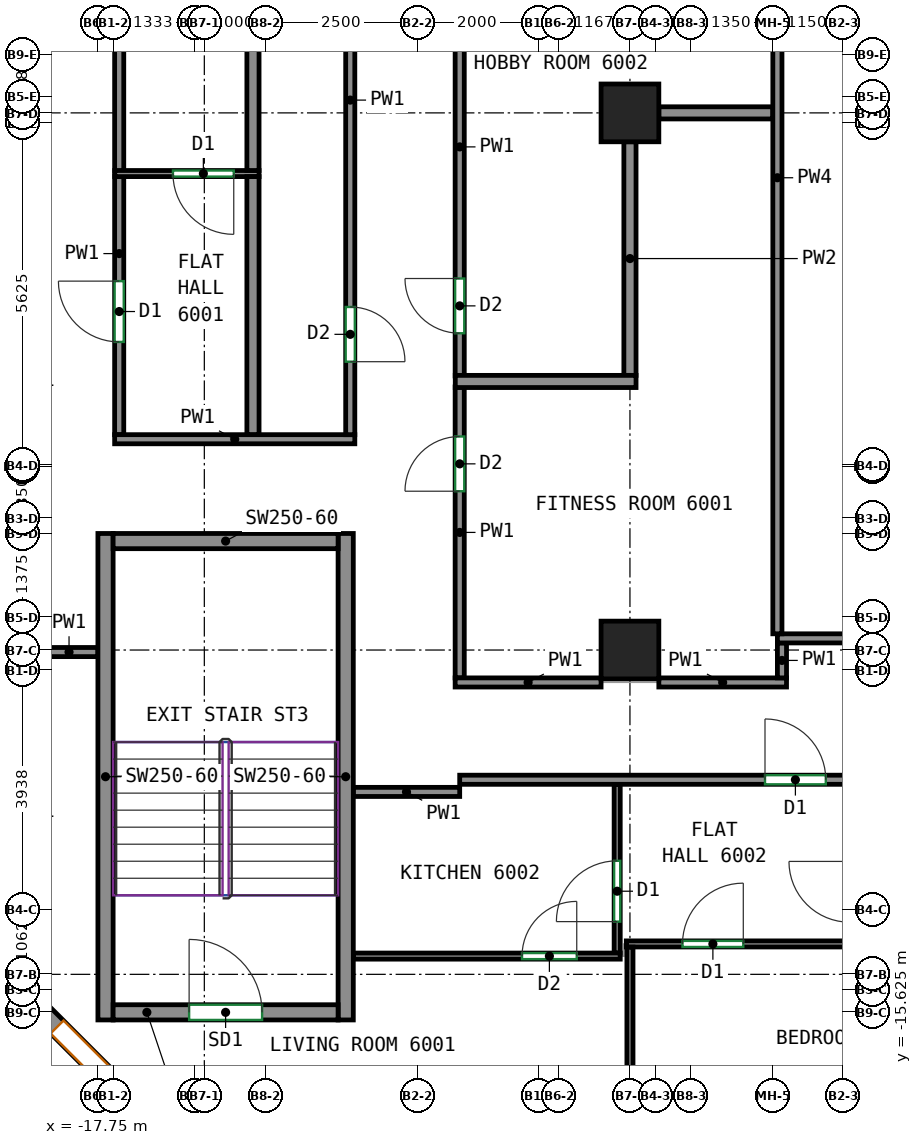
"""IFC4 building model, lengths in metres.
Left out: names, types, materials, properties, quantities, classifications, styles, units other than length and angle.
Written with IfcOpenShell. Run it as: python <this file> out.ifc"""

import sys

from ifc_helpers import new_model, si_unit, direction, frame, frame_2d, origin, origin_2d, place, context, subcontext, project, spatial, rectangle, extrude, source, transform, mapped, element, fill, save


model = new_model("IFC4")
c1 = context("Model", 3, precision=1e-05, world=origin(), true_north=direction((0.0, 1.0)))
c2 = subcontext(c1, "Body", "Model", "MODEL_VIEW")
j1 = project(units=[si_unit("LENGTHUNIT", "METRE"), si_unit("PLANEANGLEUNIT", "RADIAN")], contexts=[c1])
p1 = place(None, origin())
s1 = spatial("IfcSite", under=j1, at=p1, CompositionType="ELEMENT")
p2 = place(p1, origin())
s2 = spatial("IfcBuilding", under=s1, at=p2, CompositionType="ELEMENT")
p3 = place(p2, frame((0.0, 0.0, 249.2)))
s3 = spatial("IfcBuildingStorey", under=s2, at=p3, CompositionType="ELEMENT", Elevation=249.2)
m1 = source(origin(), c2, "Body", "SweptSolid", [
    extrude(rectangle(XDim=0.95, YDim=0.95, at=origin_2d()), origin(), (0.0, 0.0, 1.0), 3.12),
])
for number, where, z_axis, x_axis in (
    (1, (-9.0, -9.667, 0.0), (0.0, 0.0, 1.0), (1.0, 0.0, 0.0)),
    (2, (-9.0, -0.833, 0.0), (0.0, 0.0, 1.0), (1.0, 0.0, 0.0)),
):
    element("IfcColumn", number, at=place(p3, frame(where, z_axis=z_axis, x_axis=x_axis)), inside=s3, PredefinedType="COLUMN", context=c2, shape_type="MappedRepresentation", body=[
        mapped(m1, transform((0.0, 0.0, 0.0))),
    ])
m2 = source(origin(), c2, "Body", "SweptSolid", [
    extrude(rectangle(XDim=8.0, YDim=0.25, at=frame_2d((4.0, 0.0))), origin(), (0.0, 0.0, 1.0), 3.12),
])
for number, where, z_axis, x_axis in (
    (3, (-17.625, -15.75, 0.0), (0.0, 0.0, 1.0), (0.0, 1.0, 0.0)),
    (4, (-13.675, -15.75, 0.0), (0.0, 0.0, 1.0), (0.0, 1.0, 0.0)),
):
    element("IfcWall", number, at=place(p3, frame(where, z_axis=z_axis, x_axis=x_axis)), inside=s3, PredefinedType="SHEAR", context=c2, shape_type="MappedRepresentation", body=[
        mapped(m2, transform((0.0, 0.0, 0.0))),
    ])
m3 = source(origin(), c2, "Body", "SweptSolid", [
    extrude(rectangle(XDim=3.7, YDim=0.25, at=frame_2d((1.85, 0.0))), origin(), (0.0, 0.0, 1.0), 3.12),
])
p4 = place(p3, frame((-17.5, -15.625, 0.0), z_axis=(0.0, 0.0, 1.0), x_axis=(1.0, 0.0, 0.0)))
e5 = element("IfcWall", 5, at=p4, inside=s3, PredefinedType="SHEAR", context=c2, shape_type="MappedRepresentation", body=[
    mapped(m3, transform((0.0, 0.0, 0.0))),
])
p5 = place(p4, frame((1.25, 0.0, 0.0)))
e6 = element("IfcOpeningElement", 6, at=p5, cuts=e5, PredefinedType="OPENING", context=c2, shape_type="SweptSolid", body=[
    extrude(rectangle(XDim=1.2, YDim=2.1, at=frame_2d((0.6, 1.05))), frame((0.0, 0.135, 0.0), z_axis=(0.0, -1.0, 0.0), x_axis=(1.0, 0.0, 0.0)), (0.0, 0.0, 1.0), 0.27),
])
p6 = place(p3, frame((-17.5, -7.875, 0.0), z_axis=(0.0, 0.0, 1.0), x_axis=(1.0, 0.0, 0.0)))
e7 = element("IfcWall", 7, at=p6, inside=s3, PredefinedType="SHEAR", context=c2, shape_type="MappedRepresentation", body=[
    mapped(m3, transform((0.0, 0.0, 0.0))),
])
m4 = source(origin(), c2, "Body", "SweptSolid", [
    extrude(rectangle(XDim=3.323, YDim=0.3, at=frame_2d((1.662, 0.0))), origin(), (0.0, 0.0, 1.0), 3.12),
])
p7 = place(p3, frame((-18.819, -15.469, 0.0), z_axis=(0.0, 0.0, 1.0), x_axis=(0.707070049321, -0.707143511144, 0.0)))
e8 = element("IfcWall", 8, at=p7, inside=s3, PredefinedType="SOLIDWALL", context=c2, shape_type="MappedRepresentation", body=[
    mapped(m4, transform((0.0, 0.0, 0.0))),
])
p8 = place(p7, frame((0.562, 0.0, 0.8)))
e9 = element("IfcOpeningElement", 9, at=p8, cuts=e8, PredefinedType="OPENING", context=c2, shape_type="SweptSolid", body=[
    extrude(rectangle(XDim=2.2, YDim=2.05, at=frame_2d((1.1, 1.025))), frame((0.0, 0.16, 0.0), z_axis=(0.0, -1.0, 0.0), x_axis=(1.0, 0.0, 0.0)), (0.0, 0.0, 1.0), 0.32),
])
p9 = place(p3, frame((-17.4, -6.125, 0.0), z_axis=(0.0, 0.0, 1.0), x_axis=(0.0, 1.0, 0.0)))
e10 = element("IfcWall", 10, at=p9, inside=s3, PredefinedType="PARTITIONING", context=c2, shape_type="SweptSolid", body=[
    extrude(rectangle(XDim=4.254, YDim=0.15, at=frame_2d((2.127, 0.0))), origin(), (0.0, 0.0, 1.0), 3.12),
])
p10 = place(p9, frame((1.525, 0.0, 0.0)))
e11 = element("IfcOpeningElement", 11, at=p10, cuts=e10, PredefinedType="OPENING", context=c2, shape_type="SweptSolid", body=[
    extrude(rectangle(XDim=1.0, YDim=2.1, at=frame_2d((0.5, 1.05))), frame((0.0, 0.085, 0.0), z_axis=(0.0, -1.0, 0.0), x_axis=(1.0, 0.0, 0.0)), (0.0, 0.0, 1.0), 0.17),
])
p11 = place(p3, frame((-17.475, -6.2, 0.0), z_axis=(0.0, 0.0, 1.0), x_axis=(1.0, 0.0, 0.0)))
e12 = element("IfcWall", 12, at=p11, inside=s3, PredefinedType="PARTITIONING", context=c2, shape_type="SweptSolid", body=[
    extrude(rectangle(XDim=3.95, YDim=0.15, at=frame_2d((1.975, 0.0))), origin(), (0.0, 0.0, 1.0), 3.12),
])
p12 = place(p3, frame((-17.4, -1.791, 0.0), z_axis=(0.0, 0.0, 1.0), x_axis=(0.0, 1.0, 0.0)))
e13 = element("IfcWall", 13, at=p12, inside=s3, PredefinedType="PARTITIONING", context=c2, shape_type="SweptSolid", body=[
    extrude(rectangle(XDim=5.925, YDim=0.15, at=frame_2d((2.962, 0.0))), origin(), (0.0, 0.0, 1.0), 3.12),
])
p13 = place(p3, frame((-11.8, -11.8, 0.0), z_axis=(0.0, 0.0, 1.0), x_axis=(1.0, 0.0, 0.0)))
e14 = element("IfcWall", 14, at=p13, inside=s3, PredefinedType="PARTITIONING", context=c2, shape_type="SweptSolid", body=[
    extrude(rectangle(XDim=27.31, YDim=0.15, at=frame_2d((13.655, 0.0))), origin(), (0.0, 0.0, 1.0), 3.12),
])
p14 = place(p13, frame((5.021, 0.0, 0.0)))
e15 = element("IfcOpeningElement", 15, at=p14, cuts=e14, PredefinedType="OPENING", context=c2, shape_type="SweptSolid", body=[
    extrude(rectangle(XDim=1.0, YDim=2.1, at=frame_2d((0.5, 1.05))), frame((0.0, 0.085, 0.0), z_axis=(0.0, -1.0, 0.0), x_axis=(1.0, 0.0, 0.0)), (0.0, 0.0, 1.0), 0.17),
])
p15 = place(p13, frame((18.457, 0.0, 0.0)))
e16 = element("IfcOpeningElement", 16, at=p15, cuts=e14, PredefinedType="OPENING", context=c2, shape_type="SweptSolid", body=[
    extrude(rectangle(XDim=1.0, YDim=2.1, at=frame_2d((0.5, 1.05))), frame((0.0, 0.085, 0.0), z_axis=(0.0, -1.0, 0.0), x_axis=(1.0, 0.0, 0.0)), (0.0, 0.0, 1.0), 0.17),
])
p16 = place(p3, frame((-13.55, -12.0, 0.0), z_axis=(0.0, 0.0, 1.0), x_axis=(1.0, 0.0, 0.0)))
e17 = element("IfcWall", 17, at=p16, inside=s3, PredefinedType="PARTITIONING", context=c2, shape_type="SweptSolid", body=[
    extrude(rectangle(XDim=1.75, YDim=0.15, at=frame_2d((0.875, 0.0))), origin(), (0.0, 0.0, 1.0), 3.12),
])
p17 = place(p3, frame((-18.7, -9.7, 0.0), z_axis=(0.0, 0.0, 1.0), x_axis=(1.0, 0.0, 0.0)))
e18 = element("IfcWall", 18, at=p17, inside=s3, PredefinedType="PARTITIONING", context=c2, shape_type="SweptSolid", body=[
    extrude(rectangle(XDim=0.95, YDim=0.15, at=frame_2d((0.475, 0.0))), origin(), (0.0, 0.0, 1.0), 3.12),
])
p18 = place(p3, frame((-13.6, 4.879, 0.0), z_axis=(0.0, 0.0, 1.0), x_axis=(0.0, -1.0, 0.0)))
e19 = element("IfcWall", 19, at=p18, inside=s3, PredefinedType="PARTITIONING", context=c2, shape_type="SweptSolid", body=[
    extrude(rectangle(XDim=11.004, YDim=0.15, at=frame_2d((5.502, 0.0))), origin(), (0.0, 0.0, 1.0), 3.12),
])
p19 = place(p18, frame((8.904, 0.0, 0.0)))
e20 = element("IfcOpeningElement", 20, at=p19, cuts=e19, PredefinedType="OPENING", context=c2, shape_type="SweptSolid", body=[
    extrude(rectangle(XDim=0.9, YDim=2.1, at=frame_2d((0.45, 1.05))), frame((0.0, 0.085, 0.0), z_axis=(0.0, -1.0, 0.0), x_axis=(1.0, 0.0, 0.0)), (0.0, 0.0, 1.0), 0.17),
])
p20 = place(p3, frame((-11.8, -5.16, 0.0), z_axis=(0.0, 0.0, 1.0), x_axis=(0.0, 1.0, 0.0)))
e21 = element("IfcWall", 21, at=p20, inside=s3, PredefinedType="PARTITIONING", context=c2, shape_type="SweptSolid", body=[
    extrude(rectangle(XDim=7.535, YDim=0.15, at=frame_2d((3.768, 0.0))), origin(), (0.0, 0.0, 1.0), 3.12),
])
p21 = place(p20, frame((0.703, 0.0, 0.0)))
e22 = element("IfcOpeningElement", 22, at=p21, cuts=e21, PredefinedType="OPENING", context=c2, shape_type="SweptSolid", body=[
    extrude(rectangle(XDim=0.9, YDim=2.1, at=frame_2d((0.45, 1.05))), frame((0.0, 0.085, 0.0), z_axis=(0.0, -1.0, 0.0), x_axis=(1.0, 0.0, 0.0)), (0.0, 0.0, 1.0), 0.17),
])
p22 = place(p3, frame((-11.8, -10.125, 0.0), z_axis=(0.0, 0.0, 1.0), x_axis=(0.0, 1.0, 0.0)))
e23 = element("IfcWall", 23, at=p22, inside=s3, PredefinedType="PARTITIONING", context=c2, shape_type="SweptSolid", body=[
    extrude(rectangle(XDim=4.785, YDim=0.15, at=frame_2d((2.393, 0.0))), origin(), (0.0, 0.0, 1.0), 3.12),
])
p23 = place(p22, frame((3.07, 0.0, 0.0)))
e24 = element("IfcOpeningElement", 24, at=p23, cuts=e23, PredefinedType="OPENING", context=c2, shape_type="SweptSolid", body=[
    extrude(rectangle(XDim=0.9, YDim=2.1, at=frame_2d((0.45, 1.05))), frame((0.0, 0.085, 0.0), z_axis=(0.0, -1.0, 0.0), x_axis=(1.0, 0.0, 0.0)), (0.0, 0.0, 1.0), 0.17),
])
p24 = place(p3, frame((-8.525, -10.2, 0.0), z_axis=(0.0, 0.0, 1.0), x_axis=(1.0, 0.0, 0.0)))
e25 = element("IfcWall", 25, at=p24, inside=s3, PredefinedType="PARTITIONING", context=c2, shape_type="SweptSolid", body=[
    extrude(rectangle(XDim=2.1, YDim=0.15, at=frame_2d((1.05, 0.0))), origin(), (0.0, 0.0, 1.0), 3.12),
])
p25 = place(p3, frame((-11.875, -10.2, 0.0), z_axis=(0.0, 0.0, 1.0), x_axis=(1.0, 0.0, 0.0)))
e26 = element("IfcWall", 26, at=p25, inside=s3, PredefinedType="PARTITIONING", context=c2, shape_type="SweptSolid", body=[
    extrude(rectangle(XDim=2.4, YDim=0.15, at=frame_2d((1.2, 0.0))), origin(), (0.0, 0.0, 1.0), 3.12),
])
p26 = place(p3, frame((-6.5, -9.55, 0.0), z_axis=(0.0, 0.0, 1.0), x_axis=(0.0, -1.0, 0.0)))
e27 = element("IfcWall", 27, at=p26, inside=s3, PredefinedType="PARTITIONING", context=c2, shape_type="SweptSolid", body=[
    extrude(rectangle(XDim=0.575, YDim=0.15, at=frame_2d((0.288, 0.0))), origin(), (0.0, 0.0, 1.0), 3.12),
])
p27 = place(p3, frame((-15.1, -1.831, 0.0), z_axis=(0.0, 0.0, 1.0), x_axis=(-1.0, 0.0, 0.0)))
e28 = element("IfcWall", 28, at=p27, inside=s3, PredefinedType="PARTITIONING", context=c2, shape_type="SweptSolid", body=[
    extrude(rectangle(XDim=2.373, YDim=0.1, at=frame_2d((1.187, 0.0))), origin(), (0.0, 0.0, 1.0), 3.12),
])
p28 = place(p27, frame((0.416, 0.0, 0.0)))
e29 = element("IfcOpeningElement", 29, at=p28, cuts=e28, PredefinedType="OPENING", context=c2, shape_type="SweptSolid", body=[
    extrude(rectangle(XDim=1.0, YDim=2.1, at=frame_2d((0.5, 1.05))), frame((0.0, 0.06, 0.0), z_axis=(0.0, -1.0, 0.0), x_axis=(1.0, 0.0, 0.0)), (0.0, 0.0, 1.0), 0.12),
])
p29 = place(p3, frame((-15.2, -6.123, 0.0), z_axis=(0.0, 0.0, 1.0), x_axis=(0.0, 1.0, 0.0)))
e30 = element("IfcWall", 30, at=p29, inside=s3, PredefinedType="PARTITIONING", context=c2, shape_type="SweptSolid", body=[
    extrude(rectangle(XDim=4.242, YDim=0.2, at=frame_2d((2.121, 0.0))), origin(), (0.0, 0.0, 1.0), 3.12),
])
p30 = place(p3, frame((-15.2, -1.781, 0.0), z_axis=(0.0, 0.0, 1.0), x_axis=(0.0, 1.0, 0.0)))
e31 = element("IfcWall", 31, at=p30, inside=s3, PredefinedType="PARTITIONING", context=c2, shape_type="SweptSolid", body=[
    extrude(rectangle(XDim=5.905, YDim=0.2, at=frame_2d((2.953, 0.0))), origin(), (0.0, 0.0, 1.0), 3.12),
])
p31 = place(p3, frame((-9.21, -14.65, 0.0), z_axis=(0.0, 0.0, 1.0), x_axis=(0.0, 1.0, 0.0)))
e32 = element("IfcWall", 32, at=p31, inside=s3, PredefinedType="PARTITIONING", context=c2, shape_type="SweptSolid", body=[
    extrude(rectangle(XDim=2.773, YDim=0.1, at=frame_2d((1.386, 0.0))), origin(), (0.0, 0.0, 1.0), 3.12),
])
p32 = place(p31, frame((0.517, 0.0, 0.0)))
e33 = element("IfcOpeningElement", 33, at=p32, cuts=e32, PredefinedType="OPENING", context=c2, shape_type="SweptSolid", body=[
    extrude(rectangle(XDim=1.0, YDim=2.1, at=frame_2d((0.5, 1.05))), frame((0.0, 0.06, 0.0), z_axis=(0.0, -1.0, 0.0), x_axis=(1.0, 0.0, 0.0)), (0.0, 0.0, 1.0), 0.12),
])
p33 = place(p3, frame((-13.55, -14.7, 0.0), z_axis=(0.0, 0.0, 1.0), x_axis=(1.0, 0.0, 0.0)))
e34 = element("IfcWall", 34, at=p33, inside=s3, PredefinedType="PARTITIONING", context=c2, shape_type="SweptSolid", body=[
    extrude(rectangle(XDim=4.39, YDim=0.1, at=frame_2d((2.195, 0.0))), origin(), (0.0, 0.0, 1.0), 3.12),
])
p34 = place(p33, frame((2.775, 0.0, 0.0)))
e35 = element("IfcOpeningElement", 35, at=p34, cuts=e34, PredefinedType="OPENING", context=c2, shape_type="SweptSolid", body=[
    extrude(rectangle(XDim=0.9, YDim=2.1, at=frame_2d((0.45, 1.05))), frame((0.0, 0.06, 0.0), z_axis=(0.0, -1.0, 0.0), x_axis=(1.0, 0.0, 0.0)), (0.0, 0.0, 1.0), 0.12),
])
p35 = place(p3, frame((-9.06, -14.5, 0.0), z_axis=(0.0, 0.0, 1.0), x_axis=(1.0, 0.0, 0.0)))
e36 = element("IfcWall", 36, at=p35, inside=s3, PredefinedType="PARTITIONING", context=c2, shape_type="SweptSolid", body=[
    extrude(rectangle(XDim=24.66, YDim=0.1, at=frame_2d((12.33, 0.0))), origin(), (0.0, 0.0, 1.0), 3.12),
])
p36 = place(p35, frame((0.924, 0.0, 0.0)))
e37 = element("IfcOpeningElement", 37, at=p36, cuts=e36, PredefinedType="OPENING", context=c2, shape_type="SweptSolid", body=[
    extrude(rectangle(XDim=1.0, YDim=2.1, at=frame_2d((0.5, 1.05))), frame((0.0, 0.06, 0.0), z_axis=(0.0, -1.0, 0.0), x_axis=(1.0, 0.0, 0.0)), (0.0, 0.0, 1.0), 0.12),
])
p37 = place(p35, frame((15.945, 0.0, 0.0)))
e38 = element("IfcOpeningElement", 38, at=p37, cuts=e36, PredefinedType="OPENING", context=c2, shape_type="SweptSolid", body=[
    extrude(rectangle(XDim=1.0, YDim=2.1, at=frame_2d((0.5, 1.05))), frame((0.0, 0.06, 0.0), z_axis=(0.0, -1.0, 0.0), x_axis=(1.0, 0.0, 0.0)), (0.0, 0.0, 1.0), 0.12),
])
p38 = place(p35, frame((18.387, 0.0, 0.0)))
e39 = element("IfcOpeningElement", 39, at=p38, cuts=e36, PredefinedType="OPENING", context=c2, shape_type="SweptSolid", body=[
    extrude(rectangle(XDim=1.0, YDim=2.1, at=frame_2d((0.5, 1.05))), frame((0.0, 0.06, 0.0), z_axis=(0.0, -1.0, 0.0), x_axis=(1.0, 0.0, 0.0)), (0.0, 0.0, 1.0), 0.12),
])
p39 = place(p3, frame((-9.0, -17.7, 0.0), z_axis=(0.0, 0.0, 1.0), x_axis=(0.0, 1.0, 0.0)))
e40 = element("IfcWall", 40, at=p39, inside=s3, PredefinedType="PARTITIONING", context=c2, shape_type="SweptSolid", body=[
    extrude(rectangle(XDim=3.148, YDim=0.1, at=frame_2d((1.574, 0.0))), origin(), (0.0, 0.0, 1.0), 3.12),
])
p40 = place(p3, frame((-8.525, -0.833, 0.0), z_axis=(0.0, 0.0, 1.0), x_axis=(1.0, 0.0, 0.0)))
e41 = element("IfcWall", 41, at=p40, inside=s3, PredefinedType="PARTITIONING", context=c2, shape_type="SweptSolid", body=[
    extrude(rectangle(XDim=1.875, YDim=0.2, at=frame_2d((0.938, 0.0))), origin(), (0.0, 0.0, 1.0), 3.12),
])
p41 = place(p3, frame((-9.0, -5.15, 0.0), z_axis=(0.0, 0.0, 1.0), x_axis=(0.0, 1.0, 0.0)))
e42 = element("IfcWall", 42, at=p41, inside=s3, PredefinedType="PARTITIONING", context=c2, shape_type="SweptSolid", body=[
    extrude(rectangle(XDim=3.842, YDim=0.2, at=frame_2d((1.921, 0.0))), origin(), (0.0, 0.0, 1.0), 2.57),
])
p42 = place(p3, frame((-11.873, -5.25, 0.0), z_axis=(0.0, 0.0, 1.0), x_axis=(1.0, 0.0, 0.0)))
e43 = element("IfcWall", 43, at=p42, inside=s3, PredefinedType="PARTITIONING", context=c2, shape_type="SweptSolid", body=[
    extrude(rectangle(XDim=2.973, YDim=0.2, at=frame_2d((1.487, 0.0))), origin(), (0.0, 0.0, 1.0), 3.12),
])
p43 = place(p3, frame((8.5, -9.475, 0.0), z_axis=(0.0, 0.0, 1.0), x_axis=(-1.0, 0.0, 0.0)))
e44 = element("IfcWall", 44, at=p43, inside=s3, PredefinedType="PARTITIONING", context=c2, shape_type="SweptSolid", body=[
    extrude(rectangle(XDim=15.075, YDim=0.15, at=frame_2d((7.538, 0.0))), origin(), (0.0, 0.0, 1.0), 3.12),
])
p44 = place(p3, frame((-6.575, -9.4, 0.0), z_axis=(0.0, 0.0, 1.0), x_axis=(0.0, 1.0, 0.0)))
e45 = element("IfcWall", 45, at=p44, inside=s3, PredefinedType="PARTITIONING", context=c2, shape_type="SweptSolid", body=[
    extrude(rectangle(XDim=15.0, YDim=0.15, at=frame_2d((7.5, 0.0))), origin(), (0.0, 0.0, 1.0), 3.12),
])
p45 = place(p8, origin())
e46 = element("IfcWindow", 46, at=p45, inside=s3, PartitioningType="SINGLE_PANEL", PredefinedType="WINDOW", context=c2, shape_type="SweptSolid", body=[
    extrude(rectangle(XDim=2.2, YDim=2.05, at=frame_2d((1.1, 1.025))), frame((0.0, 0.03, 0.0), z_axis=(0.0, -1.0, 0.0), x_axis=(1.0, 0.0, 0.0)), (0.0, 0.0, 1.0), 0.06),
])
fill(e9, e46)
p46 = place(p5, origin())
e47 = element("IfcDoor", 47, at=p46, inside=s3, OperationType="DOUBLE_DOOR_SINGLE_SWING", PredefinedType="DOOR", context=c2, shape_type="SweptSolid", body=[
    extrude(rectangle(XDim=1.2, YDim=2.1, at=frame_2d((0.6, 1.05))), frame((0.0, 0.025, 0.0), z_axis=(0.0, -1.0, 0.0), x_axis=(1.0, 0.0, 0.0)), (0.0, 0.0, 1.0), 0.05),
])
fill(e6, e47)
p47 = place(p34, origin())
e48 = element("IfcDoor", 48, at=p47, inside=s3, OperationType="SINGLE_SWING_RIGHT", PredefinedType="DOOR", context=c2, shape_type="SweptSolid", body=[
    extrude(rectangle(XDim=0.9, YDim=2.1, at=frame_2d((0.45, 1.05))), frame((0.0, 0.025, 0.0), z_axis=(0.0, -1.0, 0.0), x_axis=(1.0, 0.0, 0.0)), (0.0, 0.0, 1.0), 0.05),
])
fill(e35, e48)
p48 = place(p36, origin())
e49 = element("IfcDoor", 49, at=p48, inside=s3, OperationType="SINGLE_SWING_RIGHT", PredefinedType="DOOR", context=c2, shape_type="SweptSolid", body=[
    extrude(rectangle(XDim=1.0, YDim=2.1, at=frame_2d((0.5, 1.05))), frame((0.0, 0.025, 0.0), z_axis=(0.0, -1.0, 0.0), x_axis=(1.0, 0.0, 0.0)), (0.0, 0.0, 1.0), 0.05),
])
fill(e37, e49)
p49 = place(p32, origin())
e50 = element("IfcDoor", 50, at=p49, inside=s3, OperationType="SINGLE_SWING_LEFT", PredefinedType="DOOR", context=c2, shape_type="SweptSolid", body=[
    extrude(rectangle(XDim=1.0, YDim=2.1, at=frame_2d((0.5, 1.05))), frame((0.0, 0.025, 0.0), z_axis=(0.0, -1.0, 0.0), x_axis=(1.0, 0.0, 0.0)), (0.0, 0.0, 1.0), 0.05),
])
fill(e33, e50)
p50 = place(p14, origin())
e51 = element("IfcDoor", 51, at=p50, inside=s3, OperationType="SINGLE_SWING_LEFT", PredefinedType="DOOR", context=c2, shape_type="SweptSolid", body=[
    extrude(rectangle(XDim=1.0, YDim=2.1, at=frame_2d((0.5, 1.05))), frame((0.0, 0.025, 0.0), z_axis=(0.0, -1.0, 0.0), x_axis=(1.0, 0.0, 0.0)), (0.0, 0.0, 1.0), 0.05),
])
fill(e15, e51)
p51 = place(p23, origin())
e52 = element("IfcDoor", 52, at=p51, inside=s3, OperationType="SINGLE_SWING_LEFT", PredefinedType="DOOR", context=c2, shape_type="SweptSolid", body=[
    extrude(rectangle(XDim=0.9, YDim=2.1, at=frame_2d((0.45, 1.05))), frame((0.0, 0.025, 0.0), z_axis=(0.0, -1.0, 0.0), x_axis=(1.0, 0.0, 0.0)), (0.0, 0.0, 1.0), 0.05),
])
fill(e24, e52)
p52 = place(p19, origin())
e53 = element("IfcDoor", 53, at=p52, inside=s3, OperationType="SINGLE_SWING_RIGHT", PredefinedType="DOOR", context=c2, shape_type="SweptSolid", body=[
    extrude(rectangle(XDim=0.9, YDim=2.1, at=frame_2d((0.45, 1.05))), frame((0.0, 0.025, 0.0), z_axis=(0.0, -1.0, 0.0), x_axis=(1.0, 0.0, 0.0)), (0.0, 0.0, 1.0), 0.05),
])
fill(e20, e53)
p53 = place(p10, origin())
e54 = element("IfcDoor", 54, at=p53, inside=s3, OperationType="SINGLE_SWING_RIGHT", PredefinedType="DOOR", context=c2, shape_type="SweptSolid", body=[
    extrude(rectangle(XDim=1.0, YDim=2.1, at=frame_2d((0.5, 1.05))), frame((0.0, 0.025, 0.0), z_axis=(0.0, -1.0, 0.0), x_axis=(1.0, 0.0, 0.0)), (0.0, 0.0, 1.0), 0.05),
])
fill(e11, e54)
p54 = place(p21, origin())
e55 = element("IfcDoor", 55, at=p54, inside=s3, OperationType="SINGLE_SWING_RIGHT", PredefinedType="DOOR", context=c2, shape_type="SweptSolid", body=[
    extrude(rectangle(XDim=0.9, YDim=2.1, at=frame_2d((0.45, 1.05))), frame((0.0, 0.025, 0.0), z_axis=(0.0, -1.0, 0.0), x_axis=(1.0, 0.0, 0.0)), (0.0, 0.0, 1.0), 0.05),
])
fill(e22, e55)
p55 = place(p28, origin())
e56 = element("IfcDoor", 56, at=p55, inside=s3, OperationType="SINGLE_SWING_LEFT", PredefinedType="DOOR", context=c2, shape_type="SweptSolid", body=[
    extrude(rectangle(XDim=1.0, YDim=2.1, at=frame_2d((0.5, 1.05))), frame((0.0, 0.025, 0.0), z_axis=(0.0, -1.0, 0.0), x_axis=(1.0, 0.0, 0.0)), (0.0, 0.0, 1.0), 0.05),
])
fill(e29, e56)
save(model, sys.argv[1])
